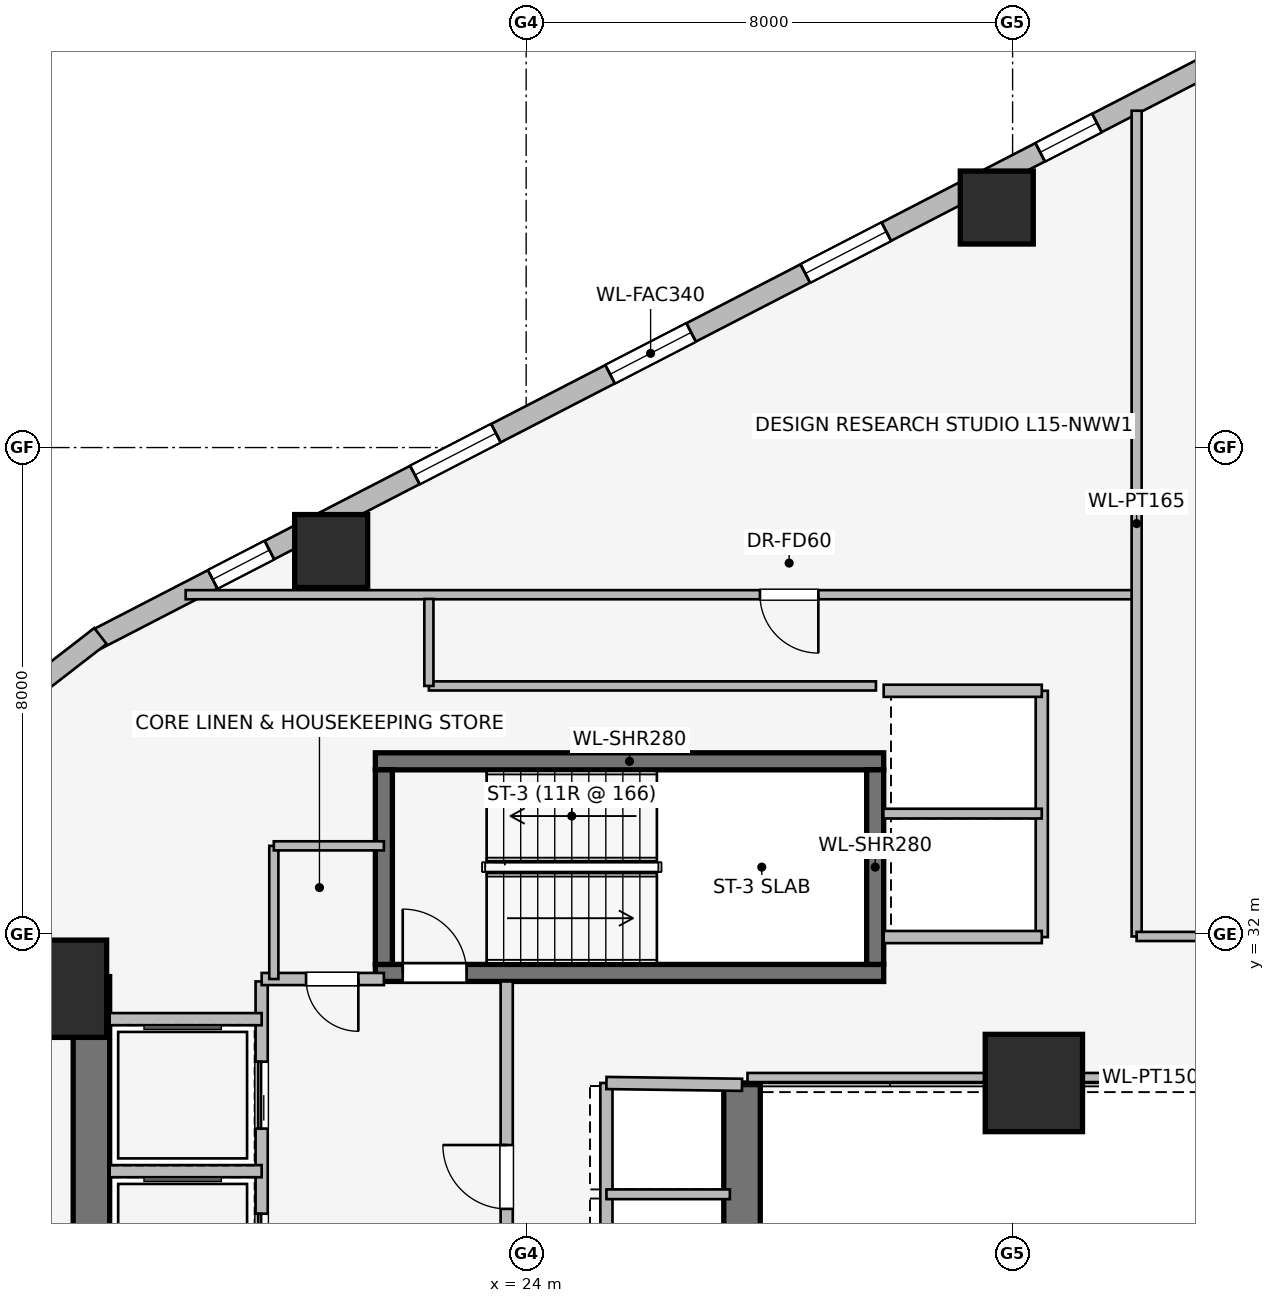
"""IFC4 building model, lengths in metres.
Left out: names, types, materials, properties, quantities, classifications, styles, units other than length and angle.
Written with IfcOpenShell. Run it as: python <this file> out.ifc"""

import sys

from ifc_helpers import new_model, si_unit, direction, frame, frame_2d, origin, origin_2d, place, context, subcontext, project, spatial, rectangle, extrude, element, fill, save


model = new_model("IFC4")
c1 = context("Model", 3, precision=1e-05, world=origin(), true_north=direction((0.0, 1.0)))
c2 = subcontext(c1, "Body", "Model", "MODEL_VIEW")
j1 = project(units=[si_unit("LENGTHUNIT", "METRE"), si_unit("PLANEANGLEUNIT", "RADIAN")], contexts=[c1])
p1 = place(None, origin())
s1 = spatial("IfcSite", under=j1, at=p1, CompositionType="ELEMENT")
p2 = place(p1, origin())
s2 = spatial("IfcBuilding", under=s1, at=p2, CompositionType="ELEMENT")
p3 = place(p2, frame((0.0, 0.0, 59.85)))
s3 = spatial("IfcBuildingStorey", under=s2, at=p3, CompositionType="ELEMENT", Elevation=59.85)
p4 = place(p3, frame((16.85, 25.68, 0.0), z_axis=(0.0, 0.0, 1.0), x_axis=(0.0, 1.0, 0.0)))
e1 = element("IfcWall", 1, at=p4, inside=s3, PredefinedType="SHEAR", context=c2, shape_type="SweptSolid", body=[
    extrude(rectangle(XDim=5.62, YDim=0.6, at=frame_2d((2.81, 0.0))), origin(), (0.0, 0.0, 1.0), 3.65),
])
p5 = place(p3, frame((27.55, 29.55, 0.0), z_axis=(0.0, 0.0, 1.0), x_axis=(0.0, -1.0, 0.0)))
e2 = element("IfcWall", 2, at=p5, inside=s3, PredefinedType="SHEAR", context=c2, shape_type="SweptSolid", body=[
    extrude(rectangle(XDim=11.25, YDim=0.6, at=frame_2d((5.625, 0.0))), origin(), (0.0, 0.0, 1.0), 3.65),
])
p6 = place(p3, frame((21.52, 31.36, 0.0), z_axis=(0.0, 0.0, 1.0), x_axis=(1.0, 0.0, 0.0)))
e3 = element("IfcWall", 3, at=p6, inside=s3, PredefinedType="SHEAR", context=c2, shape_type="SweptSolid", body=[
    extrude(rectangle(XDim=8.36, YDim=0.28, at=frame_2d((4.18, 0.0))), origin(), (0.0, 0.0, 1.0), 3.65),
])
p7 = place(p6, frame((0.45, 0.0, 0.0)))
e4 = element("IfcOpeningElement", 4, at=p7, cuts=e3, PredefinedType="OPENING", context=c2, shape_type="SweptSolid", body=[
    extrude(rectangle(XDim=1.05, YDim=2.0, at=frame_2d((0.525, 1.0))), frame((0.0, 0.15, 0.0), z_axis=(0.0, -1.0, 0.0), x_axis=(1.0, 0.0, 0.0)), (0.0, 0.0, 1.0), 0.3),
])
p8 = place(p3, frame((29.88, 34.84, 0.0), z_axis=(0.0, 0.0, 1.0), x_axis=(-1.0, 0.0, 0.0)))
e5 = element("IfcWall", 5, at=p8, inside=s3, PredefinedType="SHEAR", context=c2, shape_type="SweptSolid", body=[
    extrude(rectangle(XDim=8.36, YDim=0.28, at=frame_2d((4.18, 0.0))), origin(), (0.0, 0.0, 1.0), 3.65),
])
for number, where, z_axis, x_axis in (
    (6, (21.66, 34.7, 0.0), (0.0, 0.0, 1.0), (0.0, -1.0, 0.0)),
    (7, (29.74, 31.5, 0.0), (0.0, 0.0, 1.0), (0.0, 1.0, 0.0)),
):
    element("IfcWall", number, at=place(p3, frame(where, z_axis=z_axis, x_axis=x_axis)), inside=s3, PredefinedType="SHEAR", context=c2, shape_type="SweptSolid", body=[
        extrude(rectangle(XDim=3.2, YDim=0.28, at=frame_2d((1.6, 0.0))), origin(), (0.0, 0.0, 1.0), 3.65),
    ])
for number, where, z_axis, x_axis in (
    (8, (16.3, 31.1, 0.0), (0.0, 0.0, 1.0), (1.0, 0.0, 0.0)),
    (9, (32.35, 29.55, 0.0), (0.0, 0.0, 1.0), (1.0, 0.0, 0.0)),
):
    element("IfcColumn", number, at=place(p3, frame(where, z_axis=z_axis, x_axis=x_axis)), inside=s3, PredefinedType="COLUMN", context=c2, shape_type="SweptSolid", body=[
        extrude(rectangle(XDim=1.6, YDim=1.6, at=origin_2d()), origin(), (0.0, 0.0, 1.0), 3.65),
    ])
for number, where, z_axis, x_axis in (
    (10, (31.74, 43.947, 0.0), (0.0, 0.0, 1.0), (1.0, 0.0, 0.0)),
    (11, (20.793, 38.298, 0.0), (0.0, 0.0, 1.0), (1.0, 0.0, 0.0)),
):
    element("IfcColumn", number, at=place(p3, frame(where, z_axis=z_axis, x_axis=x_axis)), inside=s3, PredefinedType="COLUMN", context=c2, shape_type="SweptSolid", body=[
        extrude(rectangle(XDim=1.2, YDim=1.2, at=origin_2d()), origin(), (0.0, 0.0, 1.0), 3.65),
    ])
p9 = place(p3, frame((16.924, 36.841, 0.0), z_axis=(0.0, 0.0, 1.0), x_axis=(0.888634413993, 0.458616264721, 0.0)))
e12 = element("IfcWall", 12, at=p9, inside=s3, PredefinedType="STANDARD", context=c2, shape_type="SweptSolid", body=[
    extrude(rectangle(XDim=20.531, YDim=0.34, at=frame_2d((10.266, 0.0))), origin(), (0.0, 0.0, 1.0), 2.684),
])
p10 = place(p9, frame((2.161, 0.0, 0.75)))
e13 = element("IfcOpeningElement", 13, at=p10, cuts=e12, PredefinedType="OPENING", context=c2, shape_type="SweptSolid", body=[
    extrude(rectangle(XDim=1.05, YDim=1.4, at=frame_2d((0.525, 0.7))), frame((0.0, 0.18, 0.0), z_axis=(0.0, -1.0, 0.0), x_axis=(1.0, 0.0, 0.0)), (0.0, 0.0, 1.0), 0.36),
])
p11 = place(p9, frame((5.903, 0.0, 0.75)))
e14 = element("IfcOpeningElement", 14, at=p11, cuts=e12, PredefinedType="OPENING", context=c2, shape_type="SweptSolid", body=[
    extrude(rectangle(XDim=1.5, YDim=1.5, at=frame_2d((0.75, 0.75))), frame((0.0, 0.18, 0.0), z_axis=(0.0, -1.0, 0.0), x_axis=(1.0, 0.0, 0.0)), (0.0, 0.0, 1.0), 0.36),
])
p12 = place(p9, frame((9.516, 0.0, 0.75)))
e15 = element("IfcOpeningElement", 15, at=p12, cuts=e12, PredefinedType="OPENING", context=c2, shape_type="SweptSolid", body=[
    extrude(rectangle(XDim=1.5, YDim=1.5, at=frame_2d((0.75, 0.75))), frame((0.0, 0.18, 0.0), z_axis=(0.0, -1.0, 0.0), x_axis=(1.0, 0.0, 0.0)), (0.0, 0.0, 1.0), 0.36),
])
p13 = place(p9, frame((13.129, 0.0, 0.75)))
e16 = element("IfcOpeningElement", 16, at=p13, cuts=e12, PredefinedType="OPENING", context=c2, shape_type="SweptSolid", body=[
    extrude(rectangle(XDim=1.5, YDim=1.5, at=frame_2d((0.75, 0.75))), frame((0.0, 0.18, 0.0), z_axis=(0.0, -1.0, 0.0), x_axis=(1.0, 0.0, 0.0)), (0.0, 0.0, 1.0), 0.36),
])
p14 = place(p9, frame((17.476, 0.0, 0.75)))
e17 = element("IfcOpeningElement", 17, at=p14, cuts=e12, PredefinedType="OPENING", context=c2, shape_type="SweptSolid", body=[
    extrude(rectangle(XDim=1.05, YDim=1.4, at=frame_2d((0.525, 0.7))), frame((0.0, 0.18, 0.0), z_axis=(0.0, -1.0, 0.0), x_axis=(1.0, 0.0, 0.0)), (0.0, 0.0, 1.0), 0.36),
])
p15 = place(p3, frame((15.673, 35.875, 0.0), z_axis=(0.0, 0.0, 1.0), x_axis=(0.790691856293, 0.61221433207, 0.0)))
e18 = element("IfcWall", 18, at=p15, inside=s3, PredefinedType="STANDARD", context=c2, shape_type="SweptSolid", body=[
    extrude(rectangle(XDim=1.676, YDim=0.33, at=frame_2d((0.838, 0.0))), origin(), (0.0, 0.0, 1.0), 3.39),
])
p16 = place(p3, frame((19.65, 25.68, 0.0), z_axis=(0.0, 0.0, 1.0), x_axis=(0.0, 1.0, 0.0)))
e19 = element("IfcWall", 19, at=p16, inside=s3, PredefinedType="PARTITIONING", context=c2, shape_type="SweptSolid", body=[
    extrude(rectangle(XDim=5.54, YDim=0.2, at=frame_2d((2.77, 0.0))), origin(), (0.0, 0.0, 1.0), 3.39),
])
p17 = place(p16, frame((0.62, 0.0, 0.0)))
e20 = element("IfcOpeningElement", 20, at=p17, cuts=e19, PredefinedType="OPENING", context=c2, shape_type="SweptSolid", body=[
    extrude(rectangle(XDim=1.1, YDim=2.2, at=frame_2d((0.55, 1.1))), frame((0.0, 0.11, 0.0), z_axis=(0.0, -1.0, 0.0), x_axis=(1.0, 0.0, 0.0)), (0.0, 0.0, 1.0), 0.22),
])
p18 = place(p16, frame((3.12, 0.0, 0.0)))
e21 = element("IfcOpeningElement", 21, at=p18, cuts=e19, PredefinedType="OPENING", context=c2, shape_type="SweptSolid", body=[
    extrude(rectangle(XDim=1.1, YDim=2.2, at=frame_2d((0.55, 1.1))), frame((0.0, 0.11, 0.0), z_axis=(0.0, -1.0, 0.0), x_axis=(1.0, 0.0, 0.0)), (0.0, 0.0, 1.0), 0.22),
])
p19 = place(p3, frame((23.68, 25.68, 0.0), z_axis=(0.0, 0.0, 1.0), x_axis=(0.0, 1.0, 0.0)))
e22 = element("IfcWall", 22, at=p19, inside=s3, PredefinedType="PARTITIONING", context=c2, shape_type="SweptSolid", body=[
    extrude(rectangle(XDim=5.54, YDim=0.2, at=frame_2d((2.77, 0.0))), origin(), (0.0, 0.0, 1.0), 3.39),
])
p20 = place(p19, frame((1.8, 0.0, 0.0)))
e23 = element("IfcOpeningElement", 23, at=p20, cuts=e22, PredefinedType="OPENING", context=c2, shape_type="SweptSolid", body=[
    extrude(rectangle(XDim=1.05, YDim=2.0, at=frame_2d((0.525, 1.0))), frame((0.0, 0.11, 0.0), z_axis=(0.0, -1.0, 0.0), x_axis=(1.0, 0.0, 0.0)), (0.0, 0.0, 1.0), 0.22),
])
p21 = place(p3, frame((21.66, 31.26, 0.0), z_axis=(0.0, 0.0, 1.0), x_axis=(-1.0, 0.0, 0.0)))
e24 = element("IfcWall", 24, at=p21, inside=s3, PredefinedType="PARTITIONING", context=c2, shape_type="SweptSolid", body=[
    extrude(rectangle(XDim=2.01, YDim=0.2, at=frame_2d((1.005, 0.0))), origin(), (0.0, 0.0, 1.0), 3.39),
])
p22 = place(p21, frame((0.42, 0.0, 0.0)))
e25 = element("IfcOpeningElement", 25, at=p22, cuts=e24, PredefinedType="OPENING", context=c2, shape_type="SweptSolid", body=[
    extrude(rectangle(XDim=0.86, YDim=2.0, at=frame_2d((0.43, 1.0))), frame((0.0, 0.11, 0.0), z_axis=(0.0, -1.0, 0.0), x_axis=(1.0, 0.0, 0.0)), (0.0, 0.0, 1.0), 0.22),
])
p23 = place(p3, frame((17.15, 28.1, 0.0), z_axis=(0.0, 0.0, 1.0), x_axis=(1.0, 0.0, 0.0)))
e26 = element("IfcWall", 26, at=p23, inside=s3, PredefinedType="PARTITIONING", context=c2, shape_type="SweptSolid", body=[
    extrude(rectangle(XDim=2.5, YDim=0.2, at=frame_2d((1.25, 0.0))), origin(), (0.0, 0.0, 1.0), 3.39),
])
p24 = place(p3, frame((19.65, 30.6, 0.0), z_axis=(0.0, 0.0, 1.0), x_axis=(-1.0, 0.0, 0.0)))
e27 = element("IfcWall", 27, at=p24, inside=s3, PredefinedType="PARTITIONING", context=c2, shape_type="SweptSolid", body=[
    extrude(rectangle(XDim=2.5, YDim=0.2, at=frame_2d((1.25, 0.0))), origin(), (0.0, 0.0, 1.0), 2.29),
])
p25 = place(p3, frame((32.48, 31.95, 0.0), z_axis=(0.0, 0.0, 1.0), x_axis=(0.0, 1.0, 0.0)))
e28 = element("IfcWall", 28, at=p25, inside=s3, PredefinedType="PARTITIONING", context=c2, shape_type="SweptSolid", body=[
    extrude(rectangle(XDim=4.05, YDim=0.2, at=frame_2d((2.025, 0.0))), origin(), (0.0, 0.0, 1.0), 2.513),
])
for number, where, z_axis, x_axis in (
    (29, (29.88, 36.0, 0.0), (0.0, 0.0, 1.0), (1.0, 0.0, 0.0)),
    (30, (32.48, 31.95, 0.0), (0.0, 0.0, 1.0), (-1.0, 0.0, 0.0)),
):
    element("IfcWall", number, at=place(p3, frame(where, z_axis=z_axis, x_axis=x_axis)), inside=s3, PredefinedType="PARTITIONING", context=c2, shape_type="SweptSolid", body=[
        extrude(rectangle(XDim=2.6, YDim=0.2, at=frame_2d((1.3, 0.0))), origin(), (0.0, 0.0, 1.0), 3.39),
    ])
p26 = place(p3, frame((29.875, 33.98, 0.0), z_axis=(0.0, 0.0, 1.0), x_axis=(1.0, 0.0, 0.0)))
e31 = element("IfcWall", 31, at=p26, inside=s3, PredefinedType="PARTITIONING", context=c2, shape_type="SweptSolid", body=[
    extrude(rectangle(XDim=2.605, YDim=0.16, at=frame_2d((1.302, 0.0))), origin(), (0.0, 0.0, 1.0), 3.39),
])
p27 = place(p3, frame((25.32, 29.55, 0.0), z_axis=(0.0, 0.0, 1.0), x_axis=(0.0, -1.0, 0.0)))
e32 = element("IfcWall", 32, at=p27, inside=s3, PredefinedType="PARTITIONING", context=c2, shape_type="SweptSolid", body=[
    extrude(rectangle(XDim=11.19, YDim=0.2, at=frame_2d((5.595, 0.0))), origin(), (0.0, 0.0, 1.0), 3.39),
])
p28 = place(p27, frame((6.22, 0.0, 0.0)))
e33 = element("IfcOpeningElement", 33, at=p28, cuts=e32, PredefinedType="OPENING", context=c2, shape_type="SweptSolid", body=[
    extrude(rectangle(XDim=1.1, YDim=2.2, at=frame_2d((0.55, 1.1))), frame((0.0, 0.11, 0.0), z_axis=(0.0, -1.0, 0.0), x_axis=(1.0, 0.0, 0.0)), (0.0, 0.0, 1.0), 0.22),
])
p29 = place(p27, frame((8.07, 0.0, 0.0)))
e34 = element("IfcOpeningElement", 34, at=p29, cuts=e32, PredefinedType="OPENING", context=c2, shape_type="SweptSolid", body=[
    extrude(rectangle(XDim=1.1, YDim=2.2, at=frame_2d((0.55, 1.1))), frame((0.0, 0.11, 0.0), z_axis=(0.0, -1.0, 0.0), x_axis=(1.0, 0.0, 0.0)), (0.0, 0.0, 1.0), 0.22),
])
p30 = place(p27, frame((9.73, 0.0, 0.0)))
e35 = element("IfcOpeningElement", 35, at=p30, cuts=e32, PredefinedType="OPENING", context=c2, shape_type="SweptSolid", body=[
    extrude(rectangle(XDim=1.1, YDim=2.2, at=frame_2d((0.55, 1.1))), frame((0.0, 0.11, 0.0), z_axis=(0.0, -1.0, 0.0), x_axis=(1.0, 0.0, 0.0)), (0.0, 0.0, 1.0), 0.22),
])
p31 = place(p3, frame((27.55, 29.52, 0.0), z_axis=(0.0, 0.0, 1.0), x_axis=(-0.999909343457, 0.013464949556, 0.0)))
e36 = element("IfcWall", 36, at=p31, inside=s3, PredefinedType="PARTITIONING", context=c2, shape_type="SweptSolid", body=[
    extrude(rectangle(XDim=2.23, YDim=0.2, at=frame_2d((1.115, 0.0))), origin(), (0.0, 0.0, 1.0), 2.29),
])
p32 = place(p3, frame((25.32, 27.72, 0.0), z_axis=(0.0, 0.0, 1.0), x_axis=(1.0, 0.0, 0.0)))
e37 = element("IfcWall", 37, at=p32, inside=s3, PredefinedType="PARTITIONING", context=c2, shape_type="SweptSolid", body=[
    extrude(rectangle(XDim=2.03, YDim=0.16, at=frame_2d((1.015, 0.0))), origin(), (0.0, 0.0, 1.0), 3.39),
])
p33 = place(p3, frame((19.85, 33.45, 0.0), z_axis=(0.0, 0.0, 1.0), x_axis=(0.0, -1.0, 0.0)))
e38 = element("IfcWall", 38, at=p33, inside=s3, PredefinedType="PARTITIONING", context=c2, shape_type="SweptSolid", body=[
    extrude(rectangle(XDim=2.19, YDim=0.15, at=frame_2d((1.095, 0.0))), origin(), (0.0, 0.0, 1.0), 3.39),
])
p34 = place(p3, frame((21.66, 33.45, 0.0), z_axis=(0.0, 0.0, 1.0), x_axis=(-1.0, 0.0, 0.0)))
e39 = element("IfcWall", 39, at=p34, inside=s3, PredefinedType="PARTITIONING", context=c2, shape_type="SweptSolid", body=[
    extrude(rectangle(XDim=1.81, YDim=0.15, at=frame_2d((0.905, 0.0))), origin(), (0.0, 0.0, 1.0), 3.39),
])
p35 = place(p3, frame((39.84, 29.64, 0.0), z_axis=(0.0, 0.0, 1.0), x_axis=(-1.0, 0.0, 0.0)))
e40 = element("IfcWall", 40, at=p35, inside=s3, PredefinedType="PARTITIONING", context=c2, shape_type="SweptSolid", body=[
    extrude(rectangle(XDim=12.2, YDim=0.15, at=frame_2d((6.1, 0.0))), origin(), (0.0, 0.0, 1.0), 2.531),
])
p36 = place(p3, frame((34.0, 37.58, 0.0), z_axis=(0.0, 0.0, 1.0), x_axis=(-1.0, 0.0, 0.0)))
e41 = element("IfcWall", 41, at=p36, inside=s3, PredefinedType="PARTITIONING", context=c2, shape_type="SweptSolid", body=[
    extrude(rectangle(XDim=15.6, YDim=0.15, at=frame_2d((7.8, 0.0))), origin(), (0.0, 0.0, 1.0), 3.39),
])
p37 = place(p36, frame((5.195, 0.0, 0.0)))
e42 = element("IfcOpeningElement", 42, at=p37, cuts=e41, PredefinedType="OPENING", context=c2, shape_type="SweptSolid", body=[
    extrude(rectangle(XDim=0.96, YDim=2.0, at=frame_2d((0.48, 1.0))), frame((0.0, 0.085, 0.0), z_axis=(0.0, -1.0, 0.0), x_axis=(1.0, 0.0, 0.0)), (0.0, 0.0, 1.0), 0.17),
])
p38 = place(p3, frame((34.04, 31.96, 0.0), z_axis=(0.0, 0.0, 1.0), x_axis=(0.0, 1.0, 0.0)))
e43 = element("IfcWall", 43, at=p38, inside=s3, PredefinedType="PARTITIONING", context=c2, shape_type="SweptSolid", body=[
    extrude(rectangle(XDim=13.579, YDim=0.165, at=frame_2d((6.79, 0.0))), origin(), (0.0, 0.0, 1.0), 3.39),
])
p39 = place(p3, frame((60.253, 31.96, 0.0), z_axis=(0.0, 0.0, 1.0), x_axis=(-1.0, 0.0, 0.0)))
e44 = element("IfcWall", 44, at=p39, inside=s3, PredefinedType="PARTITIONING", context=c2, shape_type="SweptSolid", body=[
    extrude(rectangle(XDim=26.213, YDim=0.15, at=frame_2d((13.106, 0.0))), origin(), (0.0, 0.0, 1.0), 3.39),
])
p40 = place(p39, frame((12.612, 0.0, 0.0)))
e45 = element("IfcOpeningElement", 45, at=p40, cuts=e44, PredefinedType="OPENING", context=c2, shape_type="SweptSolid", body=[
    extrude(rectangle(XDim=0.96, YDim=2.0, at=frame_2d((0.48, 1.0))), frame((0.0, 0.085, 0.0), z_axis=(0.0, -1.0, 0.0), x_axis=(1.0, 0.0, 0.0)), (0.0, 0.0, 1.0), 0.17),
])
p41 = place(p3, frame((29.753, 36.08, 0.0), z_axis=(0.0, 0.0, 1.0), x_axis=(-1.0, 0.0, 0.0)))
e46 = element("IfcWall", 46, at=p41, inside=s3, PredefinedType="PARTITIONING", context=c2, shape_type="SweptSolid", body=[
    extrude(rectangle(XDim=7.353, YDim=0.15, at=frame_2d((3.677, 0.0))), origin(), (0.0, 0.0, 1.0), 3.39),
])
p42 = place(p3, frame((22.4, 36.08, 0.0), z_axis=(0.0, 0.0, 1.0), x_axis=(0.0, 1.0, 0.0)))
e47 = element("IfcWall", 47, at=p42, inside=s3, PredefinedType="PARTITIONING", context=c2, shape_type="SweptSolid", body=[
    extrude(rectangle(XDim=1.43, YDim=0.15, at=frame_2d((0.715, 0.0))), origin(), (0.0, 0.0, 1.0), 3.39),
])
p43 = place(p10, origin())
e48 = element("IfcWindow", 48, at=p43, inside=s3, PartitioningType="SINGLE_PANEL", PredefinedType="WINDOW", context=c2, shape_type="SweptSolid", body=[
    extrude(rectangle(XDim=1.05, YDim=1.4, at=frame_2d((0.525, 0.7))), frame((0.0, 0.03, 0.0), z_axis=(0.0, -1.0, 0.0), x_axis=(1.0, 0.0, 0.0)), (0.0, 0.0, 1.0), 0.06),
])
fill(e13, e48)
p44 = place(p11, origin())
e49 = element("IfcWindow", 49, at=p44, inside=s3, PartitioningType="SINGLE_PANEL", PredefinedType="WINDOW", context=c2, shape_type="SweptSolid", body=[
    extrude(rectangle(XDim=1.5, YDim=1.5, at=frame_2d((0.75, 0.75))), frame((0.0, 0.03, 0.0), z_axis=(0.0, -1.0, 0.0), x_axis=(1.0, 0.0, 0.0)), (0.0, 0.0, 1.0), 0.06),
])
fill(e14, e49)
p45 = place(p12, origin())
e50 = element("IfcWindow", 50, at=p45, inside=s3, PartitioningType="SINGLE_PANEL", PredefinedType="WINDOW", context=c2, shape_type="SweptSolid", body=[
    extrude(rectangle(XDim=1.5, YDim=1.5, at=frame_2d((0.75, 0.75))), frame((0.0, 0.03, 0.0), z_axis=(0.0, -1.0, 0.0), x_axis=(1.0, 0.0, 0.0)), (0.0, 0.0, 1.0), 0.06),
])
fill(e15, e50)
p46 = place(p13, origin())
e51 = element("IfcWindow", 51, at=p46, inside=s3, PartitioningType="SINGLE_PANEL", PredefinedType="WINDOW", context=c2, shape_type="SweptSolid", body=[
    extrude(rectangle(XDim=1.5, YDim=1.5, at=frame_2d((0.75, 0.75))), frame((0.0, 0.03, 0.0), z_axis=(0.0, -1.0, 0.0), x_axis=(1.0, 0.0, 0.0)), (0.0, 0.0, 1.0), 0.06),
])
fill(e16, e51)
p47 = place(p14, origin())
e52 = element("IfcWindow", 52, at=p47, inside=s3, PartitioningType="SINGLE_PANEL", PredefinedType="WINDOW", context=c2, shape_type="SweptSolid", body=[
    extrude(rectangle(XDim=1.05, YDim=1.4, at=frame_2d((0.525, 0.7))), frame((0.0, 0.03, 0.0), z_axis=(0.0, -1.0, 0.0), x_axis=(1.0, 0.0, 0.0)), (0.0, 0.0, 1.0), 0.06),
])
fill(e17, e52)
p48 = place(p7, origin())
e53 = element("IfcDoor", 53, at=p48, inside=s3, OperationType="SINGLE_SWING_LEFT", PredefinedType="DOOR", context=c2, shape_type="SweptSolid", body=[
    extrude(rectangle(XDim=1.05, YDim=2.0, at=frame_2d((0.525, 1.0))), frame((0.0, 0.025, 0.0), z_axis=(0.0, -1.0, 0.0), x_axis=(1.0, 0.0, 0.0)), (0.0, 0.0, 1.0), 0.05),
])
fill(e4, e53)
p49 = place(p17, origin())
e54 = element("IfcDoor", 54, at=p49, inside=s3, OperationType="SLIDING_TO_LEFT", PredefinedType="DOOR", context=c2, shape_type="SweptSolid", body=[
    extrude(rectangle(XDim=1.1, YDim=2.2, at=frame_2d((0.55, 1.1))), frame((0.0, 0.025, 0.0), z_axis=(0.0, -1.0, 0.0), x_axis=(1.0, 0.0, 0.0)), (0.0, 0.0, 1.0), 0.05),
])
fill(e20, e54)
p50 = place(p18, origin())
e55 = element("IfcDoor", 55, at=p50, inside=s3, OperationType="SLIDING_TO_LEFT", PredefinedType="DOOR", context=c2, shape_type="SweptSolid", body=[
    extrude(rectangle(XDim=1.1, YDim=2.2, at=frame_2d((0.55, 1.1))), frame((0.0, 0.025, 0.0), z_axis=(0.0, -1.0, 0.0), x_axis=(1.0, 0.0, 0.0)), (0.0, 0.0, 1.0), 0.05),
])
fill(e21, e55)
p51 = place(p20, origin())
e56 = element("IfcDoor", 56, at=p51, inside=s3, OperationType="SINGLE_SWING_RIGHT", PredefinedType="DOOR", context=c2, shape_type="SweptSolid", body=[
    extrude(rectangle(XDim=1.05, YDim=2.0, at=frame_2d((0.525, 1.0))), frame((0.0, 0.025, 0.0), z_axis=(0.0, -1.0, 0.0), x_axis=(1.0, 0.0, 0.0)), (0.0, 0.0, 1.0), 0.05),
])
fill(e23, e56)
p52 = place(p22, origin())
e57 = element("IfcDoor", 57, at=p52, inside=s3, OperationType="SINGLE_SWING_LEFT", PredefinedType="DOOR", context=c2, shape_type="SweptSolid", body=[
    extrude(rectangle(XDim=0.86, YDim=2.0, at=frame_2d((0.43, 1.0))), frame((0.0, 0.025, 0.0), z_axis=(0.0, -1.0, 0.0), x_axis=(1.0, 0.0, 0.0)), (0.0, 0.0, 1.0), 0.05),
])
fill(e25, e57)
p53 = place(p37, origin())
e58 = element("IfcDoor", 58, at=p53, inside=s3, OperationType="SINGLE_SWING_LEFT", PredefinedType="DOOR", context=c2, shape_type="SweptSolid", body=[
    extrude(rectangle(XDim=0.96, YDim=2.0, at=frame_2d((0.48, 1.0))), frame((0.0, 0.025, 0.0), z_axis=(0.0, -1.0, 0.0), x_axis=(1.0, 0.0, 0.0)), (0.0, 0.0, 1.0), 0.05),
])
fill(e42, e58)
save(model, sys.argv[1])
